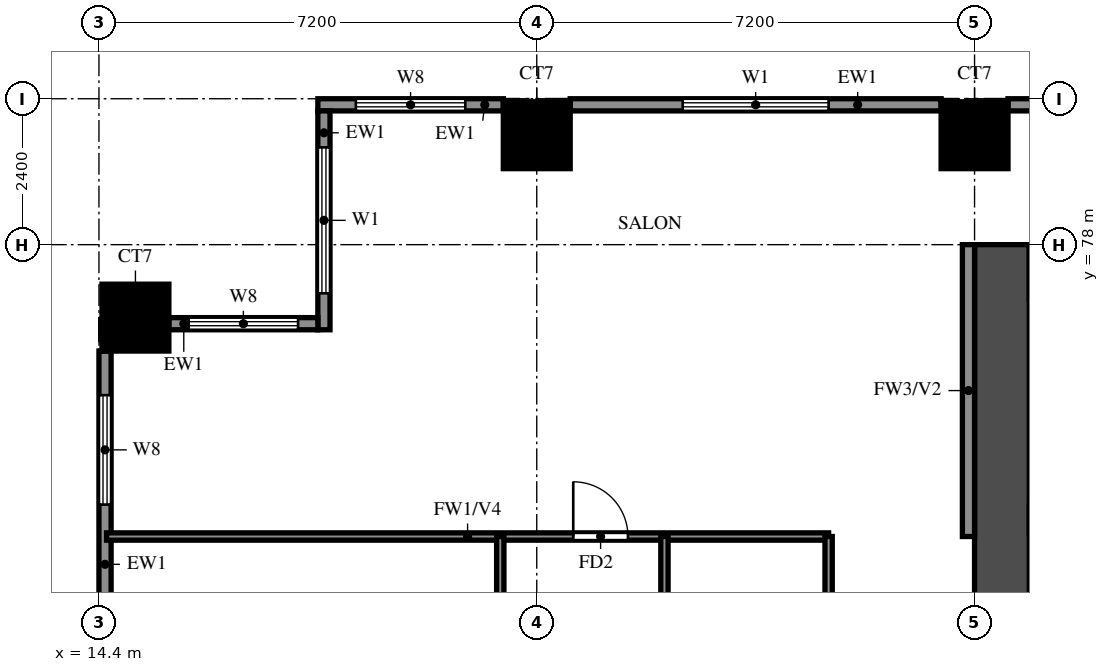
"""IFC4 building model, lengths in metres.
Left out: names, types, materials, properties, quantities, classifications, styles, units other than length and angle.
Written with IfcOpenShell. Run it as: python <this file> out.ifc"""

import sys

from ifc_helpers import new_model, si_unit, direction, frame, frame_2d, origin, origin_2d, place, context, subcontext, project, spatial, rectangle, extrude, source, transform, mapped, element, fill, save


model = new_model("IFC4")
c1 = context("Model", 3, precision=1e-05, world=origin(), true_north=direction((0.0, 1.0)))
c2 = subcontext(c1, "Body", "Model", "MODEL_VIEW")
j1 = project(units=[si_unit("LENGTHUNIT", "METRE"), si_unit("PLANEANGLEUNIT", "RADIAN")], contexts=[c1])
p1 = place(None, origin())
s1 = spatial("IfcSite", under=j1, at=p1, CompositionType="ELEMENT")
p2 = place(p1, origin())
s2 = spatial("IfcBuilding", under=s1, at=p2, CompositionType="ELEMENT")
p3 = place(p2, frame((0.0, 0.0, 44.5)))
s3 = spatial("IfcBuildingStorey", under=s2, at=p3, CompositionType="ELEMENT", Elevation=44.5)
m1 = source(origin(), c2, "Body", "SweptSolid", [
    extrude(rectangle(XDim=1.1, YDim=1.1, at=origin_2d()), origin(), (0.0, 0.0, 1.0), 3.18),
])
for number, where, z_axis, x_axis in (
    (1, (15.0, 76.8, 0.0), (0.0, 0.0, 1.0), (1.0, 0.0, 0.0)),
    (2, (21.6, 79.8, 0.0), (0.0, 0.0, 1.0), (1.0, 0.0, 0.0)),
    (3, (28.8, 79.8, 0.0), (0.0, 0.0, 1.0), (1.0, 0.0, 0.0)),
):
    element("IfcColumn", number, at=place(p3, frame(where, z_axis=z_axis, x_axis=x_axis)), inside=s3, PredefinedType="COLUMN", context=c2, shape_type="MappedRepresentation", body=[
        mapped(m1, transform((0.0, 0.0, 0.0))),
    ])
p4 = place(p3, frame((29.25, 66.0, 0.0), z_axis=(0.0, 0.0, 1.0), x_axis=(0.0, 1.0, 0.0)))
e4 = element("IfcWall", 4, at=p4, inside=s3, PredefinedType="SHEAR", context=c2, shape_type="SweptSolid", body=[
    extrude(rectangle(XDim=12.0, YDim=0.9, at=frame_2d((6.0, 0.0))), origin(), (0.0, 0.0, 1.0), 3.18),
])
p5 = place(p3, frame((29.7, 73.475, 0.0), z_axis=(0.0, 0.0, 1.0), x_axis=(1.0, 0.0, 0.0)))
e5 = element("IfcWall", 5, at=p5, inside=s3, PredefinedType="SHEAR", context=c2, shape_type="SweptSolid", body=[
    extrude(rectangle(XDim=3.175, YDim=0.45, at=frame_2d((1.587, 0.0))), origin(), (0.0, 0.0, 1.0), 3.18),
])
p6 = place(p3, frame((35.45, 80.3, 0.0), z_axis=(0.0, 0.0, 1.0), x_axis=(-1.0, 0.0, 0.0)))
e6 = element("IfcWall", 6, at=p6, inside=s3, PredefinedType="SOLIDWALL", context=c2, shape_type="SweptSolid", body=[
    extrude(rectangle(XDim=6.1, YDim=0.2, at=frame_2d((3.05, 0.0))), origin(), (0.0, 0.0, 1.0), 3.18),
])
p7 = place(p3, frame((28.25, 80.3, 0.0), z_axis=(0.0, 0.0, 1.0), x_axis=(-1.0, 0.0, 0.0)))
e7 = element("IfcWall", 7, at=p7, inside=s3, PredefinedType="SOLIDWALL", context=c2, shape_type="SweptSolid", body=[
    extrude(rectangle(XDim=6.1, YDim=0.2, at=frame_2d((3.05, 0.0))), origin(), (0.0, 0.0, 1.0), 3.18),
])
p8 = place(p7, frame((1.85, 0.0, 0.6)))
e8 = element("IfcOpeningElement", 8, at=p8, cuts=e7, PredefinedType="OPENING", context=c2, shape_type="SweptSolid", body=[
    extrude(rectangle(XDim=2.4, YDim=2.4, at=frame_2d((1.2, 1.2))), frame((0.0, 0.11, 0.0), z_axis=(0.0, -1.0, 0.0), x_axis=(1.0, 0.0, 0.0)), (0.0, 0.0, 1.0), 0.22),
])
p9 = place(p3, frame((21.05, 80.3, 0.0), z_axis=(0.0, 0.0, 1.0), x_axis=(-1.0, 0.0, 0.0)))
e9 = element("IfcWall", 9, at=p9, inside=s3, PredefinedType="SOLIDWALL", context=c2, shape_type="SweptSolid", body=[
    extrude(rectangle(XDim=3.05, YDim=0.2, at=frame_2d((1.525, 0.0))), origin(), (0.0, 0.0, 1.0), 3.18),
])
p10 = place(p9, frame((0.625, 0.0, 0.6)))
e10 = element("IfcOpeningElement", 10, at=p10, cuts=e9, PredefinedType="OPENING", context=c2, shape_type="SweptSolid", body=[
    extrude(rectangle(XDim=1.8, YDim=2.4, at=frame_2d((0.9, 1.2))), frame((0.0, 0.11, 0.0), z_axis=(0.0, -1.0, 0.0), x_axis=(1.0, 0.0, 0.0)), (0.0, 0.0, 1.0), 0.22),
])
p11 = place(p3, frame((18.1, 80.2, 0.0), z_axis=(0.0, 0.0, 1.0), x_axis=(0.0, -1.0, 0.0)))
e11 = element("IfcWall", 11, at=p11, inside=s3, PredefinedType="SOLIDWALL", context=c2, shape_type="SweptSolid", body=[
    extrude(rectangle(XDim=3.6, YDim=0.2, at=frame_2d((1.8, 0.0))), origin(), (0.0, 0.0, 1.0), 3.18),
])
p12 = place(p11, frame((0.6, 0.0, 0.6)))
e12 = element("IfcOpeningElement", 12, at=p12, cuts=e11, PredefinedType="OPENING", context=c2, shape_type="SweptSolid", body=[
    extrude(rectangle(XDim=2.4, YDim=2.4, at=frame_2d((1.2, 1.2))), frame((0.0, 0.11, 0.0), z_axis=(0.0, -1.0, 0.0), x_axis=(1.0, 0.0, 0.0)), (0.0, 0.0, 1.0), 0.22),
])
p13 = place(p3, frame((18.0, 76.7, 0.0), z_axis=(0.0, 0.0, 1.0), x_axis=(-1.0, 0.0, 0.0)))
e13 = element("IfcWall", 13, at=p13, inside=s3, PredefinedType="SOLIDWALL", context=c2, shape_type="SweptSolid", body=[
    extrude(rectangle(XDim=2.45, YDim=0.2, at=frame_2d((1.225, 0.0))), origin(), (0.0, 0.0, 1.0), 3.18),
])
p14 = place(p13, frame((0.325, 0.0, 0.6)))
e14 = element("IfcOpeningElement", 14, at=p14, cuts=e13, PredefinedType="OPENING", context=c2, shape_type="SweptSolid", body=[
    extrude(rectangle(XDim=1.8, YDim=2.4, at=frame_2d((0.9, 1.2))), frame((0.0, 0.11, 0.0), z_axis=(0.0, -1.0, 0.0), x_axis=(1.0, 0.0, 0.0)), (0.0, 0.0, 1.0), 0.22),
])
p15 = place(p3, frame((14.5, 76.25, 0.0), z_axis=(0.0, 0.0, 1.0), x_axis=(0.0, -1.0, 0.0)))
e15 = element("IfcWall", 15, at=p15, inside=s3, PredefinedType="SOLIDWALL", context=c2, shape_type="SweptSolid", body=[
    extrude(rectangle(XDim=6.1, YDim=0.2, at=frame_2d((3.05, 0.0))), origin(), (0.0, 0.0, 1.0), 3.18),
])
p16 = place(p15, frame((4.025, 0.0, 1.5)))
e16 = element("IfcOpeningElement", 16, at=p16, cuts=e15, PredefinedType="OPENING", context=c2, shape_type="SweptSolid", body=[
    extrude(rectangle(XDim=0.9, YDim=0.9, at=frame_2d((0.45, 0.45))), frame((0.0, 0.11, 0.0), z_axis=(0.0, -1.0, 0.0), x_axis=(1.0, 0.0, 0.0)), (0.0, 0.0, 1.0), 0.22),
])
p17 = place(p15, frame((0.725, 0.0, 0.6)))
e17 = element("IfcOpeningElement", 17, at=p17, cuts=e15, PredefinedType="OPENING", context=c2, shape_type="SweptSolid", body=[
    extrude(rectangle(XDim=1.8, YDim=2.4, at=frame_2d((0.9, 1.2))), frame((0.0, 0.11, 0.0), z_axis=(0.0, -1.0, 0.0), x_axis=(1.0, 0.0, 0.0)), (0.0, 0.0, 1.0), 0.22),
])
p18 = place(p3, frame((28.7, 73.2, 0.0), z_axis=(0.0, 0.0, 1.0), x_axis=(0.0, 1.0, 0.0)))
e18 = element("IfcWall", 18, at=p18, inside=s3, PredefinedType="SOLIDWALL", context=c2, shape_type="SweptSolid", body=[
    extrude(rectangle(XDim=4.8, YDim=0.2, at=frame_2d((2.4, 0.0))), origin(), (0.0, 0.0, 1.0), 3.18),
])
p19 = place(p3, frame((14.525, 73.2, 0.0), z_axis=(0.0, 0.0, 1.0), x_axis=(1.0, 0.0, 0.0)))
e19 = element("IfcWall", 19, at=p19, inside=s3, PredefinedType="PARTITIONING", context=c2, shape_type="SweptSolid", body=[
    extrude(rectangle(XDim=11.875, YDim=0.12, at=frame_2d((5.938, 0.0))), origin(), (0.0, 0.0, 1.0), 2.28),
])
p20 = place(p19, frame((7.675, 0.0, 0.0)))
e20 = element("IfcOpeningElement", 20, at=p20, cuts=e19, PredefinedType="OPENING", context=c2, shape_type="SweptSolid", body=[
    extrude(rectangle(XDim=0.9, YDim=2.1, at=frame_2d((0.45, 1.05))), frame((0.0, 0.07, 0.0), z_axis=(0.0, -1.0, 0.0), x_axis=(1.0, 0.0, 0.0)), (0.0, 0.0, 1.0), 0.14),
])
p21 = place(p3, frame((21.0, 69.6, 0.0), z_axis=(0.0, 0.0, 1.0), x_axis=(0.0, 1.0, 0.0)))
e21 = element("IfcWall", 21, at=p21, inside=s3, PredefinedType="PARTITIONING", context=c2, shape_type="SweptSolid", body=[
    extrude(rectangle(XDim=3.6, YDim=0.12, at=frame_2d((1.8, 0.0))), origin(), (0.0, 0.0, 1.0), 3.18),
])
p22 = place(p3, frame((23.7, 61.2, 0.0), z_axis=(0.0, 0.0, 1.0), x_axis=(0.0, 1.0, 0.0)))
e22 = element("IfcWall", 22, at=p22, inside=s3, PredefinedType="PARTITIONING", context=c2, shape_type="SweptSolid", body=[
    extrude(rectangle(XDim=12.0, YDim=0.12, at=frame_2d((6.0, 0.0))), origin(), (0.0, 0.0, 1.0), 3.18),
])
p23 = place(p22, frame((4.55, 0.0, 0.0)))
e23 = element("IfcOpeningElement", 23, at=p23, cuts=e22, PredefinedType="OPENING", context=c2, shape_type="SweptSolid", body=[
    extrude(rectangle(XDim=0.9, YDim=2.1, at=frame_2d((0.45, 1.05))), frame((0.0, 0.07, 0.0), z_axis=(0.0, -1.0, 0.0), x_axis=(1.0, 0.0, 0.0)), (0.0, 0.0, 1.0), 0.14),
])
p24 = place(p22, frame((9.3, 0.0, 0.0)))
e24 = element("IfcOpeningElement", 24, at=p24, cuts=e22, PredefinedType="OPENING", context=c2, shape_type="SweptSolid", body=[
    extrude(rectangle(XDim=0.8, YDim=2.1, at=frame_2d((0.4, 1.05))), frame((0.0, 0.07, 0.0), z_axis=(0.0, -1.0, 0.0), x_axis=(1.0, 0.0, 0.0)), (0.0, 0.0, 1.0), 0.14),
])
p25 = place(p3, frame((26.4, 68.6, 0.0), z_axis=(0.0, 0.0, 1.0), x_axis=(0.0, 1.0, 0.0)))
e25 = element("IfcWall", 25, at=p25, inside=s3, PredefinedType="PARTITIONING", context=c2, shape_type="SweptSolid", body=[
    extrude(rectangle(XDim=4.6, YDim=0.12, at=frame_2d((2.3, 0.0))), origin(), (0.0, 0.0, 1.0), 3.18),
])
p26 = place(p8, origin())
e26 = element("IfcWindow", 26, at=p26, inside=s3, PartitioningType="DOUBLE_PANEL_VERTICAL", PredefinedType="WINDOW", context=c2, shape_type="SweptSolid", body=[
    extrude(rectangle(XDim=2.4, YDim=2.4, at=frame_2d((1.2, 1.2))), frame((0.0, 0.03, 0.0), z_axis=(0.0, -1.0, 0.0), x_axis=(1.0, 0.0, 0.0)), (0.0, 0.0, 1.0), 0.06),
])
fill(e8, e26)
p27 = place(p10, origin())
e27 = element("IfcWindow", 27, at=p27, inside=s3, PartitioningType="DOUBLE_PANEL_VERTICAL", PredefinedType="WINDOW", context=c2, shape_type="SweptSolid", body=[
    extrude(rectangle(XDim=1.8, YDim=2.4, at=frame_2d((0.9, 1.2))), frame((0.0, 0.03, 0.0), z_axis=(0.0, -1.0, 0.0), x_axis=(1.0, 0.0, 0.0)), (0.0, 0.0, 1.0), 0.06),
])
fill(e10, e27)
p28 = place(p12, origin())
e28 = element("IfcWindow", 28, at=p28, inside=s3, PartitioningType="DOUBLE_PANEL_VERTICAL", PredefinedType="WINDOW", context=c2, shape_type="SweptSolid", body=[
    extrude(rectangle(XDim=2.4, YDim=2.4, at=frame_2d((1.2, 1.2))), frame((0.0, 0.03, 0.0), z_axis=(0.0, -1.0, 0.0), x_axis=(1.0, 0.0, 0.0)), (0.0, 0.0, 1.0), 0.06),
])
fill(e12, e28)
p29 = place(p14, origin())
e29 = element("IfcWindow", 29, at=p29, inside=s3, PartitioningType="DOUBLE_PANEL_VERTICAL", PredefinedType="WINDOW", context=c2, shape_type="SweptSolid", body=[
    extrude(rectangle(XDim=1.8, YDim=2.4, at=frame_2d((0.9, 1.2))), frame((0.0, 0.03, 0.0), z_axis=(0.0, -1.0, 0.0), x_axis=(1.0, 0.0, 0.0)), (0.0, 0.0, 1.0), 0.06),
])
fill(e14, e29)
p30 = place(p17, origin())
e30 = element("IfcWindow", 30, at=p30, inside=s3, PartitioningType="DOUBLE_PANEL_VERTICAL", PredefinedType="WINDOW", context=c2, shape_type="SweptSolid", body=[
    extrude(rectangle(XDim=1.8, YDim=2.4, at=frame_2d((0.9, 1.2))), frame((0.0, 0.03, 0.0), z_axis=(0.0, -1.0, 0.0), x_axis=(1.0, 0.0, 0.0)), (0.0, 0.0, 1.0), 0.06),
])
fill(e17, e30)
p31 = place(p20, origin())
e31 = element("IfcDoor", 31, at=p31, inside=s3, OperationType="SINGLE_SWING_LEFT", PredefinedType="DOOR", context=c2, shape_type="SweptSolid", body=[
    extrude(rectangle(XDim=0.9, YDim=2.1, at=frame_2d((0.45, 1.05))), frame((0.0, 0.025, 0.0), z_axis=(0.0, -1.0, 0.0), x_axis=(1.0, 0.0, 0.0)), (0.0, 0.0, 1.0), 0.05),
])
fill(e20, e31)
save(model, sys.argv[1])
